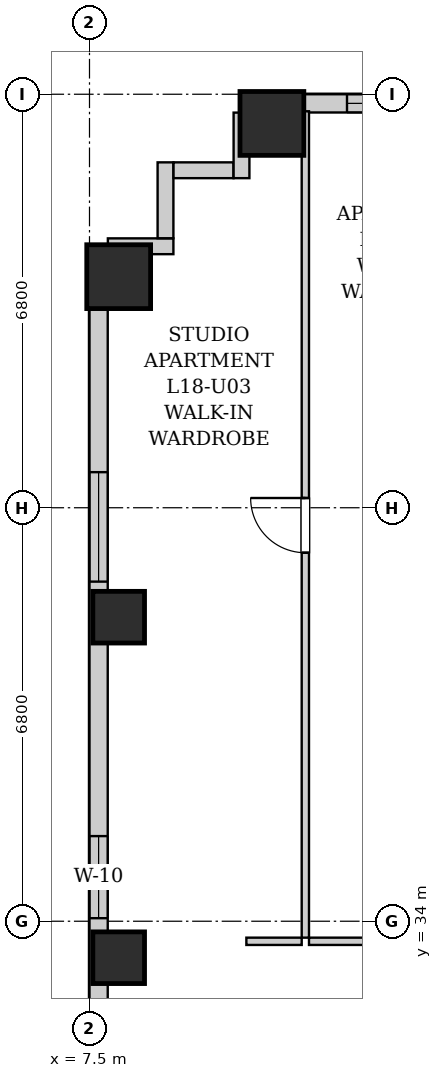
"""IFC4 building model, lengths in metres.
Left out: names, types, materials, properties, quantities, classifications, styles, units other than length and angle.
Written with IfcOpenShell. Run it as: python <this file> out.ifc"""

import sys

from ifc_helpers import new_model, si_unit, direction, frame, frame_2d, origin, origin_2d, place, context, subcontext, project, spatial, rectangle, extrude, element, fill, save


model = new_model("IFC4")
c1 = context("Model", 3, precision=1e-05, world=origin(), true_north=direction((0.0, 1.0)))
c2 = subcontext(c1, "Body", "Model", "MODEL_VIEW")
j1 = project(units=[si_unit("LENGTHUNIT", "METRE"), si_unit("PLANEANGLEUNIT", "RADIAN")], contexts=[c1])
p1 = place(None, origin())
s1 = spatial("IfcSite", under=j1, at=p1, CompositionType="ELEMENT")
p2 = place(p1, origin())
s2 = spatial("IfcBuilding", under=s1, at=p2, CompositionType="ELEMENT")
p3 = place(p2, frame((0.0, 0.0, 67.4)))
s3 = spatial("IfcBuildingStorey", under=s2, at=p3, CompositionType="ELEMENT", Elevation=67.4)
p4 = place(p3, frame((10.5, 47.12, 0.0), z_axis=(0.0, 0.0, 1.0), x_axis=(1.0, 0.0, 0.0)))
e1 = element("IfcColumn", 1, at=p4, inside=s3, PredefinedType="COLUMN", context=c2, shape_type="SweptSolid", body=[
    extrude(rectangle(XDim=1.05, YDim=1.05, at=origin_2d()), origin(), (0.0, 0.0, 1.0), 3.2),
])
for number, where, z_axis, x_axis in (
    (2, (7.98, 33.4, 0.0), (0.0, 0.0, 1.0), (1.0, 0.0, 0.0)),
    (3, (7.98, 39.0, 0.0), (0.0, 0.0, 1.0), (1.0, 0.0, 0.0)),
):
    element("IfcColumn", number, at=place(p3, frame(where, z_axis=z_axis, x_axis=x_axis)), inside=s3, PredefinedType="COLUMN", context=c2, shape_type="SweptSolid", body=[
        extrude(rectangle(XDim=0.85, YDim=0.85, at=origin_2d()), origin(), (0.0, 0.0, 1.0), 3.2),
    ])
p5 = place(p3, frame((7.98, 44.6, 0.0), z_axis=(0.0, 0.0, 1.0), x_axis=(1.0, 0.0, 0.0)))
e4 = element("IfcColumn", 4, at=p5, inside=s3, PredefinedType="COLUMN", context=c2, shape_type="SweptSolid", body=[
    extrude(rectangle(XDim=1.05, YDim=1.05, at=origin_2d()), origin(), (0.0, 0.0, 1.0), 3.2),
])
p6 = place(p3, frame((10.0, 47.45, 0.0), z_axis=(0.0, 0.0, 1.0), x_axis=(1.0, 0.0, 0.0)))
e5 = element("IfcWall", 5, at=p6, inside=s3, PredefinedType="SOLIDWALL", context=c2, shape_type="SweptSolid", body=[
    extrude(rectangle(XDim=26.35, YDim=0.3, at=frame_2d((13.175, 0.0))), origin(), (0.0, 0.0, 1.0), 1.915),
])
p7 = place(p6, frame((1.735, 0.0, 0.55)))
e6 = element("IfcOpeningElement", 6, at=p7, cuts=e5, PredefinedType="OPENING", context=c2, shape_type="SweptSolid", body=[
    extrude(rectangle(XDim=1.8, YDim=1.2, at=frame_2d((0.9, 0.6))), frame((0.0, 0.16, 0.0), z_axis=(0.0, -1.0, 0.0), x_axis=(1.0, 0.0, 0.0)), (0.0, 0.0, 1.0), 0.32),
])
p8 = place(p6, frame((5.415, 0.0, 0.55)))
e7 = element("IfcOpeningElement", 7, at=p8, cuts=e5, PredefinedType="OPENING", context=c2, shape_type="SweptSolid", body=[
    extrude(rectangle(XDim=1.8, YDim=1.2, at=frame_2d((0.9, 0.6))), frame((0.0, 0.16, 0.0), z_axis=(0.0, -1.0, 0.0), x_axis=(1.0, 0.0, 0.0)), (0.0, 0.0, 1.0), 0.32),
])
p9 = place(p6, frame((10.618, 0.0, 0.55)))
e8 = element("IfcOpeningElement", 8, at=p9, cuts=e5, PredefinedType="OPENING", context=c2, shape_type="SweptSolid", body=[
    extrude(rectangle(XDim=1.8, YDim=1.2, at=frame_2d((0.9, 0.6))), frame((0.0, 0.16, 0.0), z_axis=(0.0, -1.0, 0.0), x_axis=(1.0, 0.0, 0.0)), (0.0, 0.0, 1.0), 0.32),
])
p10 = place(p6, frame((17.696, 0.0, 0.55)))
e9 = element("IfcOpeningElement", 9, at=p10, cuts=e5, PredefinedType="OPENING", context=c2, shape_type="SweptSolid", body=[
    extrude(rectangle(XDim=1.8, YDim=1.2, at=frame_2d((0.9, 0.6))), frame((0.0, 0.16, 0.0), z_axis=(0.0, -1.0, 0.0), x_axis=(1.0, 0.0, 0.0)), (0.0, 0.0, 1.0), 0.32),
])
p11 = place(p6, frame((20.815, 0.0, 0.55)))
e10 = element("IfcOpeningElement", 10, at=p11, cuts=e5, PredefinedType="OPENING", context=c2, shape_type="SweptSolid", body=[
    extrude(rectangle(XDim=1.8, YDim=1.2, at=frame_2d((0.9, 0.6))), frame((0.0, 0.16, 0.0), z_axis=(0.0, -1.0, 0.0), x_axis=(1.0, 0.0, 0.0)), (0.0, 0.0, 1.0), 0.32),
])
p12 = place(p6, frame((23.785, 0.0, 0.55)))
e11 = element("IfcOpeningElement", 11, at=p12, cuts=e5, PredefinedType="OPENING", context=c2, shape_type="SweptSolid", body=[
    extrude(rectangle(XDim=1.35, YDim=1.2, at=frame_2d((0.675, 0.6))), frame((0.0, 0.16, 0.0), z_axis=(0.0, -1.0, 0.0), x_axis=(1.0, 0.0, 0.0)), (0.0, 0.0, 1.0), 0.32),
])
p13 = place(p3, frame((7.65, 2.5, 0.0), z_axis=(0.0, 0.0, 1.0), x_axis=(0.0, 1.0, 0.0)))
e12 = element("IfcWall", 12, at=p13, inside=s3, PredefinedType="SOLIDWALL", context=c2, shape_type="SweptSolid", body=[
    extrude(rectangle(XDim=42.6, YDim=0.3, at=frame_2d((21.3, 0.0))), origin(), (0.0, 0.0, 1.0), 1.915),
])
p14 = place(p13, frame((3.15, 0.0, 0.55)))
e13 = element("IfcOpeningElement", 13, at=p14, cuts=e12, PredefinedType="OPENING", context=c2, shape_type="SweptSolid", body=[
    extrude(rectangle(XDim=1.8, YDim=1.2, at=frame_2d((0.9, 0.6))), frame((0.0, 0.16, 0.0), z_axis=(0.0, -1.0, 0.0), x_axis=(1.0, 0.0, 0.0)), (0.0, 0.0, 1.0), 0.32),
])
p15 = place(p13, frame((1.185, 0.0, 0.55)))
e14 = element("IfcOpeningElement", 14, at=p15, cuts=e12, PredefinedType="OPENING", context=c2, shape_type="SweptSolid", body=[
    extrude(rectangle(XDim=1.35, YDim=1.2, at=frame_2d((0.675, 0.6))), frame((0.0, 0.16, 0.0), z_axis=(0.0, -1.0, 0.0), x_axis=(1.0, 0.0, 0.0)), (0.0, 0.0, 1.0), 0.32),
])
p16 = place(p13, frame((37.085, 0.0, 0.55)))
e15 = element("IfcOpeningElement", 15, at=p16, cuts=e12, PredefinedType="OPENING", context=c2, shape_type="SweptSolid", body=[
    extrude(rectangle(XDim=1.8, YDim=1.2, at=frame_2d((0.9, 0.6))), frame((0.0, 0.16, 0.0), z_axis=(0.0, -1.0, 0.0), x_axis=(1.0, 0.0, 0.0)), (0.0, 0.0, 1.0), 0.32),
])
p17 = place(p13, frame((31.55, 0.0, 0.55)))
e16 = element("IfcOpeningElement", 16, at=p17, cuts=e12, PredefinedType="OPENING", context=c2, shape_type="SweptSolid", body=[
    extrude(rectangle(XDim=1.35, YDim=1.2, at=frame_2d((0.675, 0.6))), frame((0.0, 0.16, 0.0), z_axis=(0.0, -1.0, 0.0), x_axis=(1.0, 0.0, 0.0)), (0.0, 0.0, 1.0), 0.32),
])
p18 = place(p13, frame((15.2, 0.0, 0.55)))
e17 = element("IfcOpeningElement", 17, at=p18, cuts=e12, PredefinedType="OPENING", context=c2, shape_type="SweptSolid", body=[
    extrude(rectangle(XDim=1.8, YDim=1.2, at=frame_2d((0.9, 0.6))), frame((0.0, 0.16, 0.0), z_axis=(0.0, -1.0, 0.0), x_axis=(1.0, 0.0, 0.0)), (0.0, 0.0, 1.0), 0.32),
])
p19 = place(p13, frame((13.085, 0.0, 0.55)))
e18 = element("IfcOpeningElement", 18, at=p19, cuts=e12, PredefinedType="OPENING", context=c2, shape_type="SweptSolid", body=[
    extrude(rectangle(XDim=1.35, YDim=1.2, at=frame_2d((0.675, 0.6))), frame((0.0, 0.16, 0.0), z_axis=(0.0, -1.0, 0.0), x_axis=(1.0, 0.0, 0.0)), (0.0, 0.0, 1.0), 0.32),
])
p20 = place(p13, frame((22.575, 0.0, 0.55)))
e19 = element("IfcOpeningElement", 19, at=p20, cuts=e12, PredefinedType="OPENING", context=c2, shape_type="SweptSolid", body=[
    extrude(rectangle(XDim=1.8, YDim=1.2, at=frame_2d((0.9, 0.6))), frame((0.0, 0.16, 0.0), z_axis=(0.0, -1.0, 0.0), x_axis=(1.0, 0.0, 0.0)), (0.0, 0.0, 1.0), 0.32),
])
p21 = place(p3, frame((7.802, 45.1, 0.0), z_axis=(0.0, 0.0, 1.0), x_axis=(1.0, 0.0, 0.0)))
e20 = element("IfcWall", 20, at=p21, inside=s3, PredefinedType="SOLIDWALL", context=c2, shape_type="SweptSolid", body=[
    extrude(rectangle(XDim=1.078, YDim=0.26, at=frame_2d((0.539, 0.0))), origin(), (0.0, 0.0, 1.0), 2.88),
])
p22 = place(p3, frame((8.75, 45.232, 0.0), z_axis=(0.0, 0.0, 1.0), x_axis=(0.0, 1.0, 0.0)))
e21 = element("IfcWall", 21, at=p22, inside=s3, PredefinedType="SOLIDWALL", context=c2, shape_type="SweptSolid", body=[
    extrude(rectangle(XDim=1.248, YDim=0.26, at=frame_2d((0.624, 0.0))), origin(), (0.0, 0.0, 1.0), 2.88),
])
p23 = place(p3, frame((8.882, 46.35, 0.0), z_axis=(0.0, 0.0, 1.0), x_axis=(1.0, 0.0, 0.0)))
e22 = element("IfcWall", 22, at=p23, inside=s3, PredefinedType="SOLIDWALL", context=c2, shape_type="SweptSolid", body=[
    extrude(rectangle(XDim=0.986, YDim=0.26, at=frame_2d((0.493, 0.0))), origin(), (0.0, 0.0, 1.0), 2.88),
])
p24 = place(p3, frame((10.0, 46.22, 0.0), z_axis=(0.0, 0.0, 1.0), x_axis=(0.0, 1.0, 0.0)))
e23 = element("IfcWall", 23, at=p24, inside=s3, PredefinedType="SOLIDWALL", context=c2, shape_type="SweptSolid", body=[
    extrude(rectangle(XDim=1.078, YDim=0.26, at=frame_2d((0.539, 0.0))), origin(), (0.0, 0.0, 1.0), 2.88),
])
p25 = place(p3, frame((10.08, 33.67, 0.0), z_axis=(0.0, 0.0, 1.0), x_axis=(1.0, 0.0, 0.0)))
e24 = element("IfcWall", 24, at=p25, inside=s3, PredefinedType="PARTITIONING", context=c2, shape_type="SweptSolid", body=[
    extrude(rectangle(XDim=0.91, YDim=0.12, at=frame_2d((0.455, 0.0))), origin(), (0.0, 0.0, 1.0), 2.88),
])
p26 = place(p3, frame((11.11, 33.67, 0.0), z_axis=(0.0, 0.0, 1.0), x_axis=(1.0, 0.0, 0.0)))
e25 = element("IfcWall", 25, at=p26, inside=s3, PredefinedType="PARTITIONING", context=c2, shape_type="SweptSolid", body=[
    extrude(rectangle(XDim=1.37, YDim=0.12, at=frame_2d((0.685, 0.0))), origin(), (0.0, 0.0, 1.0), 2.88),
])
p27 = place(p3, frame((11.05, 33.73, 0.0), z_axis=(0.0, 0.0, 1.0), x_axis=(0.0, 1.0, 0.0)))
e26 = element("IfcWall", 26, at=p27, inside=s3, PredefinedType="PARTITIONING", context=c2, shape_type="SweptSolid", body=[
    extrude(rectangle(XDim=13.59, YDim=0.12, at=frame_2d((6.795, 0.0))), origin(), (0.0, 0.0, 1.0), 2.88),
])
p28 = place(p27, frame((6.33, 0.0, 0.0)))
e27 = element("IfcOpeningElement", 27, at=p28, cuts=e26, PredefinedType="OPENING", context=c2, shape_type="SweptSolid", body=[
    extrude(rectangle(XDim=0.9, YDim=2.05, at=frame_2d((0.45, 1.025))), frame((0.0, 0.07, 0.0), z_axis=(0.0, -1.0, 0.0), x_axis=(1.0, 0.0, 0.0)), (0.0, 0.0, 1.0), 0.14),
])
p29 = place(p28, origin())
e28 = element("IfcDoor", 28, at=p29, inside=s3, OperationType="SINGLE_SWING_RIGHT", PredefinedType="DOOR", context=c2, shape_type="SweptSolid", body=[
    extrude(rectangle(XDim=0.9, YDim=2.05, at=frame_2d((0.45, 1.025))), frame((0.0, 0.025, 0.0), z_axis=(0.0, -1.0, 0.0), x_axis=(1.0, 0.0, 0.0)), (0.0, 0.0, 1.0), 0.05),
])
fill(e27, e28)
p30 = place(p16, origin())
e29 = element("IfcWindow", 29, at=p30, inside=s3, PartitioningType="DOUBLE_PANEL_VERTICAL", PredefinedType="WINDOW", context=c2, shape_type="SweptSolid", body=[
    extrude(rectangle(XDim=1.8, YDim=1.2, at=frame_2d((0.9, 0.6))), frame((0.0, 0.03, 0.0), z_axis=(0.0, -1.0, 0.0), x_axis=(1.0, 0.0, 0.0)), (0.0, 0.0, 1.0), 0.06),
])
fill(e15, e29)
p31 = place(p17, origin())
e30 = element("IfcWindow", 30, at=p31, inside=s3, PartitioningType="SINGLE_PANEL", PredefinedType="WINDOW", context=c2, shape_type="SweptSolid", body=[
    extrude(rectangle(XDim=1.35, YDim=1.2, at=frame_2d((0.675, 0.6))), frame((0.0, 0.03, 0.0), z_axis=(0.0, -1.0, 0.0), x_axis=(1.0, 0.0, 0.0)), (0.0, 0.0, 1.0), 0.06),
])
fill(e16, e30)
p32 = place(p7, origin())
e31 = element("IfcWindow", 31, at=p32, inside=s3, PartitioningType="DOUBLE_PANEL_VERTICAL", PredefinedType="WINDOW", context=c2, shape_type="SweptSolid", body=[
    extrude(rectangle(XDim=1.8, YDim=1.2, at=frame_2d((0.9, 0.6))), frame((0.0, 0.03, 0.0), z_axis=(0.0, -1.0, 0.0), x_axis=(1.0, 0.0, 0.0)), (0.0, 0.0, 1.0), 0.06),
])
fill(e6, e31)
save(model, sys.argv[1])
